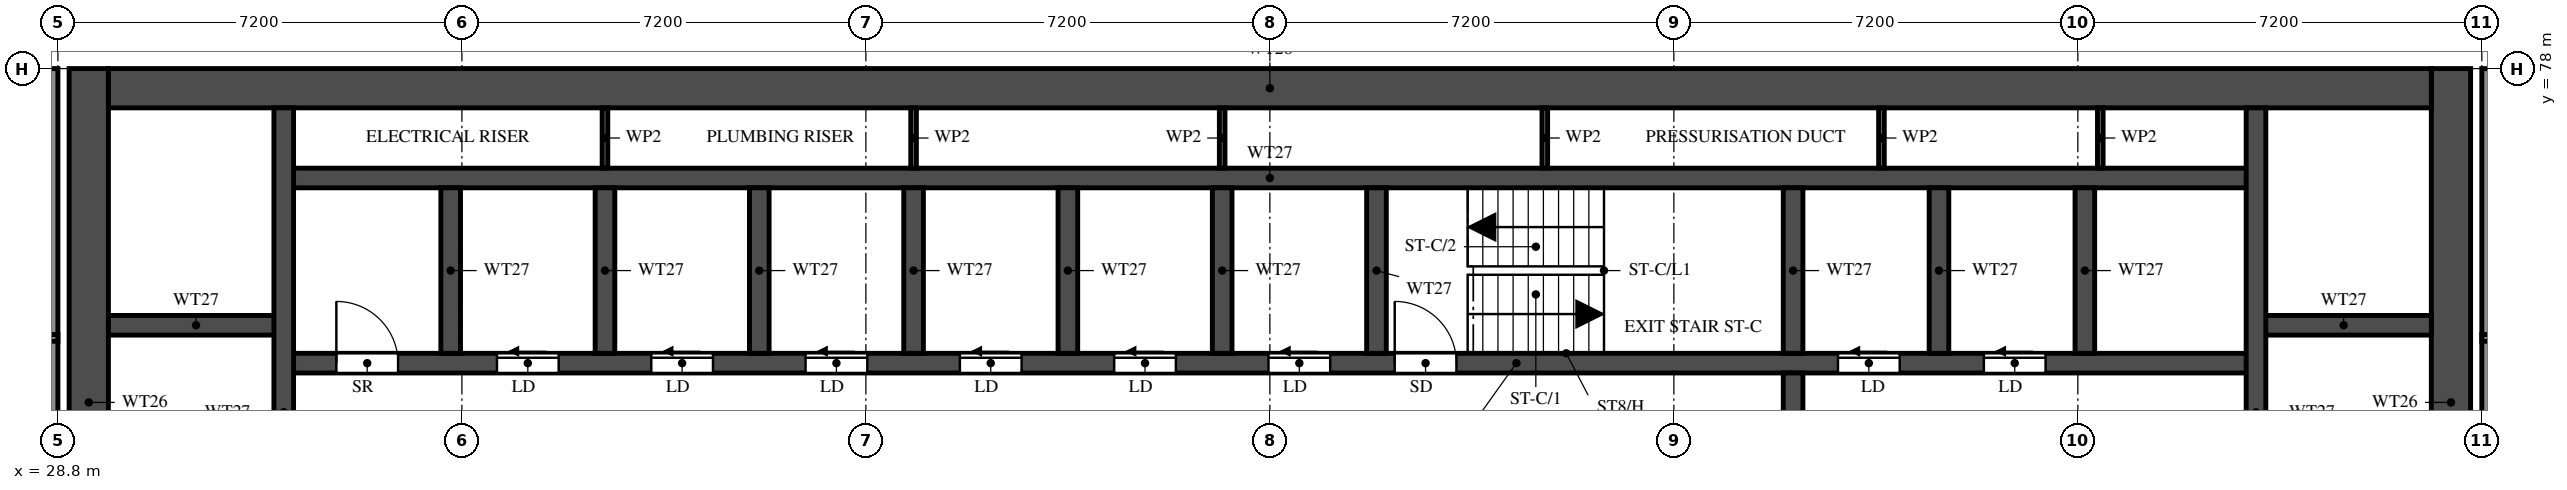
"""IFC4 building model, lengths in metres.
Left out: names, types, materials, properties, quantities, classifications, styles, units other than length and angle.
Written with IfcOpenShell. Run it as: python <this file> out.ifc"""

import sys

from ifc_helpers import new_model, si_unit, direction, frame, frame_2d, origin, place, context, subcontext, project, spatial, rectangle, extrude, element, fill, save


model = new_model("IFC4")
c1 = context("Model", 3, precision=1e-05, world=origin(), true_north=direction((0.0, 1.0)))
c2 = subcontext(c1, "Body", "Model", "MODEL_VIEW")
j1 = project(units=[si_unit("LENGTHUNIT", "METRE"), si_unit("PLANEANGLEUNIT", "RADIAN")], contexts=[c1])
p1 = place(None, origin())
s1 = spatial("IfcSite", under=j1, at=p1, CompositionType="ELEMENT")
p2 = place(p1, origin())
s2 = spatial("IfcBuilding", under=s1, at=p2, CompositionType="ELEMENT")
p3 = place(p2, frame((0.0, 0.0, 185.0)))
s3 = spatial("IfcBuildingStorey", under=s2, at=p3, CompositionType="ELEMENT", Elevation=185.0)
for number, where, z_axis, x_axis in (
    (1, (29.35, 66.1, 0.0), (0.0, 0.0, 1.0), (0.0, 1.0, 0.0)),
    (2, (71.45, 66.1, 0.0), (0.0, 0.0, 1.0), (0.0, 1.0, 0.0)),
):
    element("IfcWall", number, at=place(p3, frame(where, z_axis=z_axis, x_axis=x_axis)), inside=s3, PredefinedType="SHEAR", context=c2, shape_type="SweptSolid", body=[
        extrude(rectangle(XDim=11.9, YDim=0.7, at=frame_2d((5.95, 0.0))), origin(), (0.0, 0.0, 1.0), 3.2),
    ])
p4 = place(p3, frame((29.7, 77.65, 0.0), z_axis=(0.0, 0.0, 1.0), x_axis=(1.0, 0.0, 0.0)))
e3 = element("IfcWall", 3, at=p4, inside=s3, PredefinedType="SHEAR", context=c2, shape_type="SweptSolid", body=[
    extrude(rectangle(XDim=41.4, YDim=0.7, at=frame_2d((20.7, 0.0))), origin(), (0.0, 0.0, 1.0), 3.2),
])
p5 = place(p3, frame((32.825, 72.75, 0.0), z_axis=(0.0, 0.0, 1.0), x_axis=(1.0, 0.0, 0.0)))
e4 = element("IfcWall", 4, at=p5, inside=s3, PredefinedType="SHEAR", context=c2, shape_type="SweptSolid", body=[
    extrude(rectangle(XDim=35.15, YDim=0.35, at=frame_2d((17.575, 0.0))), origin(), (0.0, 0.0, 1.0), 3.2),
])
p6 = place(p5, frame((19.8, 0.0, 0.0)))
e5 = element("IfcOpeningElement", 5, at=p6, cuts=e4, PredefinedType="OPENING", context=c2, shape_type="SweptSolid", body=[
    extrude(rectangle(XDim=1.1, YDim=2.1, at=frame_2d((0.55, 1.05))), frame((0.0, 0.185, 0.0), z_axis=(0.0, -1.0, 0.0), x_axis=(1.0, 0.0, 0.0)), (0.0, 0.0, 1.0), 0.37),
])
p7 = place(p5, frame((27.7, 0.0, 0.0)))
e6 = element("IfcOpeningElement", 6, at=p7, cuts=e4, PredefinedType="OPENING", context=c2, shape_type="SweptSolid", body=[
    extrude(rectangle(XDim=1.1, YDim=2.1, at=frame_2d((0.55, 1.05))), frame((0.0, 0.185, 0.0), z_axis=(0.0, -1.0, 0.0), x_axis=(1.0, 0.0, 0.0)), (0.0, 0.0, 1.0), 0.37),
])
p8 = place(p5, frame((30.3, 0.0, 0.0)))
e7 = element("IfcOpeningElement", 7, at=p8, cuts=e4, PredefinedType="OPENING", context=c2, shape_type="SweptSolid", body=[
    extrude(rectangle(XDim=1.1, YDim=2.1, at=frame_2d((0.55, 1.05))), frame((0.0, 0.185, 0.0), z_axis=(0.0, -1.0, 0.0), x_axis=(1.0, 0.0, 0.0)), (0.0, 0.0, 1.0), 0.37),
])
p9 = place(p5, frame((3.8, 0.0, 0.0)))
e8 = element("IfcOpeningElement", 8, at=p9, cuts=e4, PredefinedType="OPENING", context=c2, shape_type="SweptSolid", body=[
    extrude(rectangle(XDim=1.1, YDim=2.1, at=frame_2d((0.55, 1.05))), frame((0.0, 0.185, 0.0), z_axis=(0.0, -1.0, 0.0), x_axis=(1.0, 0.0, 0.0)), (0.0, 0.0, 1.0), 0.37),
])
p10 = place(p5, frame((6.55, 0.0, 0.0)))
e9 = element("IfcOpeningElement", 9, at=p10, cuts=e4, PredefinedType="OPENING", context=c2, shape_type="SweptSolid", body=[
    extrude(rectangle(XDim=1.1, YDim=2.1, at=frame_2d((0.55, 1.05))), frame((0.0, 0.185, 0.0), z_axis=(0.0, -1.0, 0.0), x_axis=(1.0, 0.0, 0.0)), (0.0, 0.0, 1.0), 0.37),
])
p11 = place(p5, frame((9.3, 0.0, 0.0)))
e10 = element("IfcOpeningElement", 10, at=p11, cuts=e4, PredefinedType="OPENING", context=c2, shape_type="SweptSolid", body=[
    extrude(rectangle(XDim=1.1, YDim=2.1, at=frame_2d((0.55, 1.05))), frame((0.0, 0.185, 0.0), z_axis=(0.0, -1.0, 0.0), x_axis=(1.0, 0.0, 0.0)), (0.0, 0.0, 1.0), 0.37),
])
p12 = place(p5, frame((12.05, 0.0, 0.0)))
e11 = element("IfcOpeningElement", 11, at=p12, cuts=e4, PredefinedType="OPENING", context=c2, shape_type="SweptSolid", body=[
    extrude(rectangle(XDim=1.1, YDim=2.1, at=frame_2d((0.55, 1.05))), frame((0.0, 0.185, 0.0), z_axis=(0.0, -1.0, 0.0), x_axis=(1.0, 0.0, 0.0)), (0.0, 0.0, 1.0), 0.37),
])
p13 = place(p5, frame((14.8, 0.0, 0.0)))
e12 = element("IfcOpeningElement", 12, at=p13, cuts=e4, PredefinedType="OPENING", context=c2, shape_type="SweptSolid", body=[
    extrude(rectangle(XDim=1.1, YDim=2.1, at=frame_2d((0.55, 1.05))), frame((0.0, 0.185, 0.0), z_axis=(0.0, -1.0, 0.0), x_axis=(1.0, 0.0, 0.0)), (0.0, 0.0, 1.0), 0.37),
])
p14 = place(p5, frame((17.55, 0.0, 0.0)))
e13 = element("IfcOpeningElement", 13, at=p14, cuts=e4, PredefinedType="OPENING", context=c2, shape_type="SweptSolid", body=[
    extrude(rectangle(XDim=1.1, YDim=2.1, at=frame_2d((0.55, 1.05))), frame((0.0, 0.185, 0.0), z_axis=(0.0, -1.0, 0.0), x_axis=(1.0, 0.0, 0.0)), (0.0, 0.0, 1.0), 0.37),
])
p15 = place(p5, frame((0.938, 0.0, 0.0)))
e14 = element("IfcOpeningElement", 14, at=p15, cuts=e4, PredefinedType="OPENING", context=c2, shape_type="SweptSolid", body=[
    extrude(rectangle(XDim=1.1, YDim=2.1, at=frame_2d((0.55, 1.05))), frame((0.0, 0.185, 0.0), z_axis=(0.0, -1.0, 0.0), x_axis=(1.0, 0.0, 0.0)), (0.0, 0.0, 1.0), 0.37),
])
p16 = place(p3, frame((32.825, 76.05, 0.0), z_axis=(0.0, 0.0, 1.0), x_axis=(1.0, 0.0, 0.0)))
e15 = element("IfcWall", 15, at=p16, inside=s3, PredefinedType="SHEAR", context=c2, shape_type="SweptSolid", body=[
    extrude(rectangle(XDim=35.15, YDim=0.35, at=frame_2d((17.575, 0.0))), origin(), (0.0, 0.0, 1.0), 3.2),
])
for number, where, z_axis, x_axis in (
    (16, (29.7, 73.425, 0.0), (0.0, 0.0, 1.0), (1.0, 0.0, 0.0)),
    (17, (67.975, 73.425, 0.0), (0.0, 0.0, 1.0), (1.0, 0.0, 0.0)),
):
    element("IfcWall", number, at=place(p3, frame(where, z_axis=z_axis, x_axis=x_axis)), inside=s3, PredefinedType="SHEAR", context=c2, shape_type="SweptSolid", body=[
        extrude(rectangle(XDim=3.125, YDim=0.35, at=frame_2d((1.562, 0.0))), origin(), (0.0, 0.0, 1.0), 3.2),
    ])
p17 = place(p3, frame((32.825, 66.45, 0.0), z_axis=(0.0, 0.0, 1.0), x_axis=(0.0, 1.0, 0.0)))
e18 = element("IfcWall", 18, at=p17, inside=s3, PredefinedType="SHEAR", context=c2, shape_type="SweptSolid", body=[
    extrude(rectangle(XDim=10.85, YDim=0.35, at=frame_2d((5.425, 0.0))), origin(), (0.0, 0.0, 1.0), 3.2),
])
p18 = place(p3, frame((67.975, 66.45, 0.0), z_axis=(0.0, 0.0, 1.0), x_axis=(0.0, 1.0, 0.0)))
e19 = element("IfcWall", 19, at=p18, inside=s3, PredefinedType="SHEAR", context=c2, shape_type="SweptSolid", body=[
    extrude(rectangle(XDim=10.85, YDim=0.35, at=frame_2d((5.425, 0.0))), origin(), (0.0, 0.0, 1.0), 3.2),
])
p19 = place(p18, frame((0.15, 0.0, 0.0)))
e20 = element("IfcOpeningElement", 20, at=p19, cuts=e19, PredefinedType="OPENING", context=c2, shape_type="SweptSolid", body=[
    extrude(rectangle(XDim=1.1, YDim=2.1, at=frame_2d((0.55, 1.05))), frame((0.0, 0.185, 0.0), z_axis=(0.0, -1.0, 0.0), x_axis=(1.0, 0.0, 0.0)), (0.0, 0.0, 1.0), 0.37),
])
p20 = place(p3, frame((59.725, 66.45, 0.0), z_axis=(0.0, 0.0, 1.0), x_axis=(0.0, 1.0, 0.0)))
e21 = element("IfcWall", 21, at=p20, inside=s3, PredefinedType="SHEAR", context=c2, shape_type="SweptSolid", body=[
    extrude(rectangle(XDim=6.125, YDim=0.35, at=frame_2d((3.062, 0.0))), origin(), (0.0, 0.0, 1.0), 3.2),
])
p21 = place(p20, frame((3.85, 0.0, 0.0)))
e22 = element("IfcOpeningElement", 22, at=p21, cuts=e21, PredefinedType="OPENING", context=c2, shape_type="SweptSolid", body=[
    extrude(rectangle(XDim=1.2, YDim=2.1, at=frame_2d((0.6, 1.05))), frame((0.0, 0.185, 0.0), z_axis=(0.0, -1.0, 0.0), x_axis=(1.0, 0.0, 0.0)), (0.0, 0.0, 1.0), 0.37),
])
for number, where, z_axis, x_axis in (
    (23, (59.725, 72.925, 0.0), (0.0, 0.0, 1.0), (0.0, 1.0, 0.0)),
    (24, (35.8, 72.925, 0.0), (0.0, 0.0, 1.0), (0.0, 1.0, 0.0)),
    (25, (38.55, 72.925, 0.0), (0.0, 0.0, 1.0), (0.0, 1.0, 0.0)),
    (26, (41.3, 72.925, 0.0), (0.0, 0.0, 1.0), (0.0, 1.0, 0.0)),
    (27, (44.05, 72.925, 0.0), (0.0, 0.0, 1.0), (0.0, 1.0, 0.0)),
    (28, (46.8, 72.925, 0.0), (0.0, 0.0, 1.0), (0.0, 1.0, 0.0)),
    (29, (49.55, 72.925, 0.0), (0.0, 0.0, 1.0), (0.0, 1.0, 0.0)),
    (30, (52.3, 72.925, 0.0), (0.0, 0.0, 1.0), (0.0, 1.0, 0.0)),
    (31, (62.325, 72.925, 0.0), (0.0, 0.0, 1.0), (0.0, 1.0, 0.0)),
    (32, (64.925, 72.925, 0.0), (0.0, 0.0, 1.0), (0.0, 1.0, 0.0)),
):
    element("IfcWall", number, at=place(p3, frame(where, z_axis=z_axis, x_axis=x_axis)), inside=s3, PredefinedType="SHEAR", context=c2, shape_type="SweptSolid", body=[
        extrude(rectangle(XDim=2.95, YDim=0.35, at=frame_2d((1.475, 0.0))), origin(), (0.0, 0.0, 1.0), 3.2),
    ])
for number, where, z_axis, x_axis in (
    (33, (38.55, 76.225, 0.0), (0.0, 0.0, 1.0), (0.0, 1.0, 0.0)),
    (34, (44.05, 76.225, 0.0), (0.0, 0.0, 1.0), (0.0, 1.0, 0.0)),
    (35, (49.55, 76.225, 0.0), (0.0, 0.0, 1.0), (0.0, 1.0, 0.0)),
    (36, (55.3, 76.225, 0.0), (0.0, 0.0, 1.0), (0.0, 1.0, 0.0)),
    (37, (61.3, 76.225, 0.0), (0.0, 0.0, 1.0), (0.0, 1.0, 0.0)),
    (38, (65.2, 76.225, 0.0), (0.0, 0.0, 1.0), (0.0, 1.0, 0.0)),
):
    element("IfcWall", number, at=place(p3, frame(where, z_axis=z_axis, x_axis=x_axis)), inside=s3, PredefinedType="PARTITIONING", context=c2, shape_type="SweptSolid", body=[
        extrude(rectangle(XDim=1.075, YDim=0.1, at=frame_2d((0.538, 0.0))), origin(), (0.0, 0.0, 1.0), 3.2),
    ])
for number, where, z_axis, x_axis in (
    (39, (28.7, 62.4, 0.0), (0.0, 0.0, 1.0), (0.0, 1.0, 0.0)),
    (40, (72.1, 62.4, 0.0), (0.0, 0.0, 1.0), (0.0, 1.0, 0.0)),
):
    element("IfcWall", number, at=place(p3, frame(where, z_axis=z_axis, x_axis=x_axis)), inside=s3, PredefinedType="SOLIDWALL", context=c2, shape_type="SweptSolid", body=[
        extrude(rectangle(XDim=15.6, YDim=0.2, at=frame_2d((7.8, 0.0))), origin(), (0.0, 0.0, 1.0), 3.2),
    ])
p22 = place(p3, frame((14.525, 73.2, 0.0), z_axis=(0.0, 0.0, 1.0), x_axis=(1.0, 0.0, 0.0)))
e41 = element("IfcWall", 41, at=p22, inside=s3, PredefinedType="PARTITIONING", context=c2, shape_type="SweptSolid", body=[
    extrude(rectangle(XDim=14.275, YDim=0.12, at=frame_2d((7.138, 0.0))), origin(), (0.0, 0.0, 1.0), 2.3),
])
p23 = place(p22, frame((7.675, 0.0, 0.0)))
e42 = element("IfcOpeningElement", 42, at=p23, cuts=e41, PredefinedType="OPENING", context=c2, shape_type="SweptSolid", body=[
    extrude(rectangle(XDim=0.9, YDim=2.1, at=frame_2d((0.45, 1.05))), frame((0.0, 0.07, 0.0), z_axis=(0.0, -1.0, 0.0), x_axis=(1.0, 0.0, 0.0)), (0.0, 0.0, 1.0), 0.14),
])
p24 = place(p3, frame((72.0, 73.2, 0.0), z_axis=(0.0, 0.0, 1.0), x_axis=(1.0, 0.0, 0.0)))
e43 = element("IfcWall", 43, at=p24, inside=s3, PredefinedType="PARTITIONING", context=c2, shape_type="SweptSolid", body=[
    extrude(rectangle(XDim=14.275, YDim=0.12, at=frame_2d((7.137, 0.0))), origin(), (0.0, 0.0, 1.0), 2.3),
])
p25 = place(p24, frame((5.7, 0.0, 0.0)))
e44 = element("IfcOpeningElement", 44, at=p25, cuts=e43, PredefinedType="OPENING", context=c2, shape_type="SweptSolid", body=[
    extrude(rectangle(XDim=0.9, YDim=2.1, at=frame_2d((0.45, 1.05))), frame((0.0, 0.07, 0.0), z_axis=(0.0, -1.0, 0.0), x_axis=(1.0, 0.0, 0.0)), (0.0, 0.0, 1.0), 0.14),
])
p26 = place(p6, origin())
e45 = element("IfcDoor", 45, at=p26, inside=s3, OperationType="SINGLE_SWING_LEFT", PredefinedType="DOOR", context=c2, shape_type="SweptSolid", body=[
    extrude(rectangle(XDim=1.1, YDim=2.1, at=frame_2d((0.55, 1.05))), frame((0.0, 0.025, 0.0), z_axis=(0.0, -1.0, 0.0), x_axis=(1.0, 0.0, 0.0)), (0.0, 0.0, 1.0), 0.05),
])
fill(e5, e45)
p27 = place(p7, origin())
e46 = element("IfcDoor", 46, at=p27, inside=s3, OperationType="SLIDING_TO_LEFT", PredefinedType="DOOR", context=c2, shape_type="SweptSolid", body=[
    extrude(rectangle(XDim=1.1, YDim=2.1, at=frame_2d((0.55, 1.05))), frame((0.0, 0.025, 0.0), z_axis=(0.0, -1.0, 0.0), x_axis=(1.0, 0.0, 0.0)), (0.0, 0.0, 1.0), 0.05),
])
fill(e6, e46)
p28 = place(p8, origin())
e47 = element("IfcDoor", 47, at=p28, inside=s3, OperationType="SLIDING_TO_LEFT", PredefinedType="DOOR", context=c2, shape_type="SweptSolid", body=[
    extrude(rectangle(XDim=1.1, YDim=2.1, at=frame_2d((0.55, 1.05))), frame((0.0, 0.025, 0.0), z_axis=(0.0, -1.0, 0.0), x_axis=(1.0, 0.0, 0.0)), (0.0, 0.0, 1.0), 0.05),
])
fill(e7, e47)
p29 = place(p9, origin())
e48 = element("IfcDoor", 48, at=p29, inside=s3, OperationType="SLIDING_TO_LEFT", PredefinedType="DOOR", context=c2, shape_type="SweptSolid", body=[
    extrude(rectangle(XDim=1.1, YDim=2.1, at=frame_2d((0.55, 1.05))), frame((0.0, 0.025, 0.0), z_axis=(0.0, -1.0, 0.0), x_axis=(1.0, 0.0, 0.0)), (0.0, 0.0, 1.0), 0.05),
])
fill(e8, e48)
p30 = place(p10, origin())
e49 = element("IfcDoor", 49, at=p30, inside=s3, OperationType="SLIDING_TO_LEFT", PredefinedType="DOOR", context=c2, shape_type="SweptSolid", body=[
    extrude(rectangle(XDim=1.1, YDim=2.1, at=frame_2d((0.55, 1.05))), frame((0.0, 0.025, 0.0), z_axis=(0.0, -1.0, 0.0), x_axis=(1.0, 0.0, 0.0)), (0.0, 0.0, 1.0), 0.05),
])
fill(e9, e49)
p31 = place(p11, origin())
e50 = element("IfcDoor", 50, at=p31, inside=s3, OperationType="SLIDING_TO_LEFT", PredefinedType="DOOR", context=c2, shape_type="SweptSolid", body=[
    extrude(rectangle(XDim=1.1, YDim=2.1, at=frame_2d((0.55, 1.05))), frame((0.0, 0.025, 0.0), z_axis=(0.0, -1.0, 0.0), x_axis=(1.0, 0.0, 0.0)), (0.0, 0.0, 1.0), 0.05),
])
fill(e10, e50)
p32 = place(p12, origin())
e51 = element("IfcDoor", 51, at=p32, inside=s3, OperationType="SLIDING_TO_LEFT", PredefinedType="DOOR", context=c2, shape_type="SweptSolid", body=[
    extrude(rectangle(XDim=1.1, YDim=2.1, at=frame_2d((0.55, 1.05))), frame((0.0, 0.025, 0.0), z_axis=(0.0, -1.0, 0.0), x_axis=(1.0, 0.0, 0.0)), (0.0, 0.0, 1.0), 0.05),
])
fill(e11, e51)
p33 = place(p13, origin())
e52 = element("IfcDoor", 52, at=p33, inside=s3, OperationType="SLIDING_TO_LEFT", PredefinedType="DOOR", context=c2, shape_type="SweptSolid", body=[
    extrude(rectangle(XDim=1.1, YDim=2.1, at=frame_2d((0.55, 1.05))), frame((0.0, 0.025, 0.0), z_axis=(0.0, -1.0, 0.0), x_axis=(1.0, 0.0, 0.0)), (0.0, 0.0, 1.0), 0.05),
])
fill(e12, e52)
p34 = place(p14, origin())
e53 = element("IfcDoor", 53, at=p34, inside=s3, OperationType="SLIDING_TO_LEFT", PredefinedType="DOOR", context=c2, shape_type="SweptSolid", body=[
    extrude(rectangle(XDim=1.1, YDim=2.1, at=frame_2d((0.55, 1.05))), frame((0.0, 0.025, 0.0), z_axis=(0.0, -1.0, 0.0), x_axis=(1.0, 0.0, 0.0)), (0.0, 0.0, 1.0), 0.05),
])
fill(e13, e53)
p35 = place(p15, origin())
e54 = element("IfcDoor", 54, at=p35, inside=s3, OperationType="SINGLE_SWING_LEFT", PredefinedType="DOOR", context=c2, shape_type="SweptSolid", body=[
    extrude(rectangle(XDim=1.1, YDim=2.1, at=frame_2d((0.55, 1.05))), frame((0.0, 0.025, 0.0), z_axis=(0.0, -1.0, 0.0), x_axis=(1.0, 0.0, 0.0)), (0.0, 0.0, 1.0), 0.05),
])
fill(e14, e54)
save(model, sys.argv[1])
